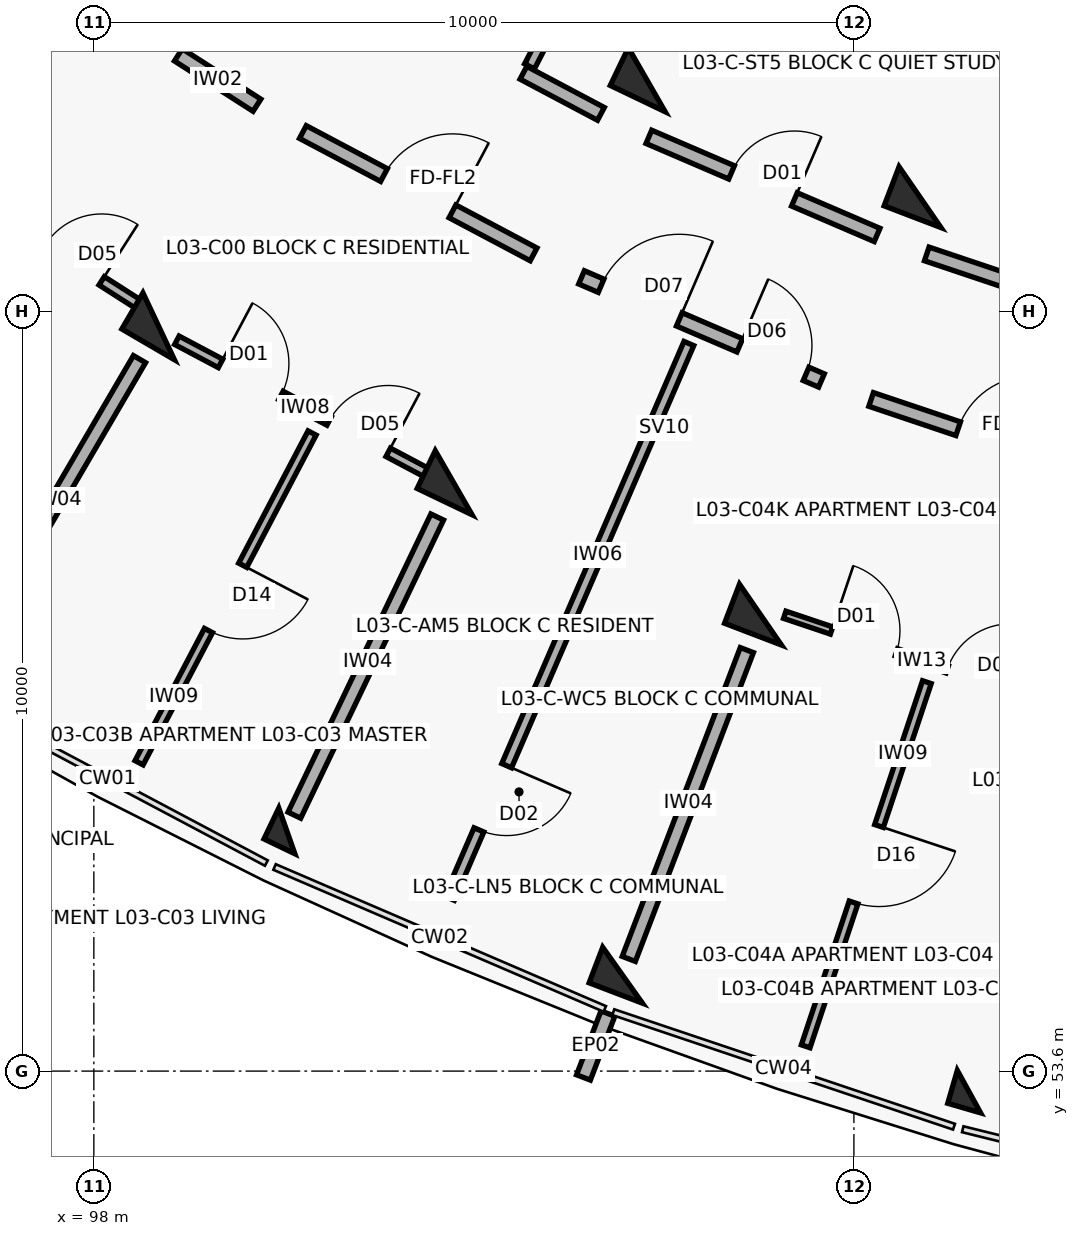
"""IFC4 building model, lengths in metres.
Left out: names, types, materials, properties, quantities, classifications, styles, units other than length and angle.
Written with IfcOpenShell. Run it as: python <this file> out.ifc"""

import sys

from ifc_helpers import new_model, si_unit, direction, frame, frame_2d, origin, origin_2d, place, context, subcontext, project, spatial, rectangle, extrude, element, fill, save


model = new_model("IFC4")
c1 = context("Model", 3, precision=1e-05, world=origin(), true_north=direction((0.0, 1.0)))
c2 = subcontext(c1, "Body", "Model", "MODEL_VIEW")
j1 = project(units=[si_unit("LENGTHUNIT", "METRE"), si_unit("PLANEANGLEUNIT", "RADIAN")], contexts=[c1])
p1 = place(None, origin())
s1 = spatial("IfcSite", under=j1, at=p1, CompositionType="ELEMENT")
p2 = place(p1, origin())
s2 = spatial("IfcBuilding", under=s1, at=p2, CompositionType="ELEMENT")
p3 = place(p2, frame((0.0, 0.0, 11.2)))
s3 = spatial("IfcBuildingStorey", under=s2, at=p3, CompositionType="ELEMENT", Elevation=11.2)
for number, where, z_axis, x_axis in (
    (1, (98.853, 63.4, 0.0), (0.0, 0.0, 1.0), (-0.504, -0.864, 0.0)),
    (2, (105.274, 66.644, 0.0), (0.0, 0.0, 1.0), (-0.432, -0.902, 0.0)),
    (3, (102.734, 61.341, 0.0), (0.0, 0.0, 1.0), (-0.432, -0.902, 0.0)),
):
    element("IfcColumn", number, at=place(p3, frame(where, z_axis=z_axis, x_axis=x_axis)), inside=s3, PredefinedType="COLUMN", context=c2, shape_type="SweptSolid", body=[
        extrude(rectangle(XDim=0.55, YDim=0.8, at=origin_2d()), origin(), (0.0, 0.0, 1.0), 3.1),
    ])
p4 = place(p3, frame((100.539, 56.76, 0.0), z_axis=(0.0, 0.0, 1.0), x_axis=(-0.432085748802, -0.901832526405, 0.0)))
e4 = element("IfcColumn", 4, at=p4, inside=s3, PredefinedType="COLUMN", context=c2, shape_type="SweptSolid", body=[
    extrude(rectangle(XDim=0.45, YDim=0.45, at=origin_2d()), origin(), (0.0, 0.0, 1.0), 3.1),
])
for number, where, z_axis, x_axis in (
    (5, (108.869, 65.099, 0.0), (0.0, 0.0, 1.0), (-0.357, -0.934, 0.0)),
    (6, (106.77, 59.606, 0.0), (0.0, 0.0, 1.0), (-0.357, -0.934, 0.0)),
):
    element("IfcColumn", number, at=place(p3, frame(where, z_axis=z_axis, x_axis=x_axis)), inside=s3, PredefinedType="COLUMN", context=c2, shape_type="SweptSolid", body=[
        extrude(rectangle(XDim=0.55, YDim=0.8, at=origin_2d()), origin(), (0.0, 0.0, 1.0), 3.1),
    ])
p5 = place(p3, frame((104.956, 54.861, 0.0), z_axis=(0.0, 0.0, 1.0), x_axis=(-0.357064076459, -0.934079892355, 0.0)))
e7 = element("IfcColumn", 7, at=p5, inside=s3, PredefinedType="COLUMN", context=c2, shape_type="SweptSolid", body=[
    extrude(rectangle(XDim=0.5, YDim=0.75, at=origin_2d()), origin(), (0.0, 0.0, 1.0), 3.1),
])
p6 = place(p3, frame((109.513, 53.329, 0.0), z_axis=(0.0, 0.0, 1.0), x_axis=(-0.27966144946, -0.96009867914, 0.0)))
e8 = element("IfcColumn", 8, at=p6, inside=s3, PredefinedType="COLUMN", context=c2, shape_type="SweptSolid", body=[
    extrude(rectangle(XDim=0.45, YDim=0.45, at=origin_2d()), origin(), (0.0, 0.0, 1.0), 3.1),
])
p7 = place(p3, frame((104.763, 54.357, 0.0), z_axis=(0.0, 0.0, 1.0), x_axis=(-0.357033038474, -0.934091756434, 0.0)))
e9 = element("IfcWall", 9, at=p7, inside=s3, PredefinedType="PARAPET", context=c2, shape_type="SweptSolid", body=[
    extrude(rectangle(XDim=0.9, YDim=0.195, at=frame_2d((0.45, 0.0))), origin(), (0.0, 0.0, 1.0), 2.25),
])
p8 = place(p3, frame((97.252, 68.161, 0.0), z_axis=(0.0, 0.0, 1.0), x_axis=(0.842289466461, -0.53902546757, 0.0)))
e10 = element("IfcWall", 10, at=p8, inside=s3, PredefinedType="SOLIDWALL", context=c2, shape_type="SweptSolid", body=[
    extrude(rectangle(XDim=3.436, YDim=0.19, at=frame_2d((1.718, 0.0))), origin(), (0.0, 0.0, 1.0), 2.08),
])
p9 = place(p8, frame((1.228, 0.0, 0.0)))
e11 = element("IfcOpeningElement", 11, at=p9, cuts=e10, PredefinedType="OPENING", context=c2, shape_type="SweptSolid", body=[
    extrude(rectangle(XDim=0.98, YDim=2.15, at=frame_2d((0.49, 1.075))), frame((0.0, 0.105, 0.0), z_axis=(0.0, -1.0, 0.0), x_axis=(1.0, 0.0, 0.0)), (0.0, 0.0, 1.0), 0.21),
])
p10 = place(p3, frame((95.462, 65.688, 0.0), z_axis=(0.0, 0.0, 1.0), x_axis=(0.842274914974, -0.539048205271, 0.0)))
e12 = element("IfcWall", 12, at=p10, inside=s3, PredefinedType="PARTITIONING", context=c2, shape_type="SweptSolid", body=[
    extrude(rectangle(XDim=3.785, YDim=0.13, at=frame_2d((1.893, 0.0))), origin(), (0.0, 0.0, 1.0), 2.08),
])
p11 = place(p10, frame((0.65, 0.0, 0.0)))
e13 = element("IfcOpeningElement", 13, at=p11, cuts=e12, PredefinedType="OPENING", context=c2, shape_type="SweptSolid", body=[
    extrude(rectangle(XDim=0.9, YDim=2.1, at=frame_2d((0.45, 1.05))), frame((0.0, 0.075, 0.0), z_axis=(0.0, -1.0, 0.0), x_axis=(1.0, 0.0, 0.0)), (0.0, 0.0, 1.0), 0.15),
])
p12 = place(p10, frame((2.255, 0.0, 0.0)))
e14 = element("IfcOpeningElement", 14, at=p12, cuts=e12, PredefinedType="OPENING", context=c2, shape_type="SweptSolid", body=[
    extrude(rectangle(XDim=0.88, YDim=2.1, at=frame_2d((0.44, 1.05))), frame((0.0, 0.075, 0.0), z_axis=(0.0, -1.0, 0.0), x_axis=(1.0, 0.0, 0.0)), (0.0, 0.0, 1.0), 0.15),
])
p13 = place(p3, frame((100.75, 65.956, 0.0), z_axis=(0.0, 0.0, 1.0), x_axis=(0.883440266101, -0.468543803963, 0.0)))
e15 = element("IfcWall", 15, at=p13, inside=s3, PredefinedType="SOLIDWALL", context=c2, shape_type="SweptSolid", body=[
    extrude(rectangle(XDim=3.436, YDim=0.19, at=frame_2d((1.718, 0.0))), origin(), (0.0, 0.0, 1.0), 2.08),
])
p14 = place(p13, frame((1.208, 0.0, 0.0)))
e16 = element("IfcOpeningElement", 16, at=p14, cuts=e15, PredefinedType="OPENING", context=c2, shape_type="SweptSolid", body=[
    extrude(rectangle(XDim=1.02, YDim=2.15, at=frame_2d((0.51, 1.075))), frame((0.0, 0.105, 0.0), z_axis=(0.0, -1.0, 0.0), x_axis=(1.0, 0.0, 0.0)), (0.0, 0.0, 1.0), 0.21),
])
p15 = place(p3, frame((101.784, 67.726, 0.0), z_axis=(0.0, 0.0, 1.0), x_axis=(0.883444301944, -0.468536194293, 0.0)))
e17 = element("IfcWall", 17, at=p15, inside=s3, PredefinedType="SOLIDWALL", context=c2, shape_type="SweptSolid", body=[
    extrude(rectangle(XDim=3.269, YDim=0.19, at=frame_2d((1.634, 0.0))), origin(), (0.0, 0.0, 1.0), 2.08),
])
p16 = place(p15, frame((1.154, 0.0, 0.0)))
e18 = element("IfcOpeningElement", 18, at=p16, cuts=e17, PredefinedType="OPENING", context=c2, shape_type="SweptSolid", body=[
    extrude(rectangle(XDim=0.96, YDim=2.1, at=frame_2d((0.48, 1.05))), frame((0.0, 0.105, 0.0), z_axis=(0.0, -1.0, 0.0), x_axis=(1.0, 0.0, 0.0)), (0.0, 0.0, 1.0), 0.21),
])
p17 = place(p3, frame((105.247, 69.752, 0.0), z_axis=(0.0, 0.0, 1.0), x_axis=(-0.459187433099, -0.888339406581, 0.0)))
e19 = element("IfcWall", 19, at=p17, inside=s3, PredefinedType="PARTITIONING", context=c2, shape_type="SweptSolid", body=[
    extrude(rectangle(XDim=3.3, YDim=0.145, at=frame_2d((1.65, 0.0))), origin(), (0.0, 0.0, 1.0), 2.08),
])
p18 = place(p17, frame((1.21, 0.0, 0.0)))
e20 = element("IfcOpeningElement", 20, at=p18, cuts=e19, PredefinedType="OPENING", context=c2, shape_type="SweptSolid", body=[
    extrude(rectangle(XDim=0.88, YDim=2.1, at=frame_2d((0.44, 1.05))), frame((0.0, 0.083, 0.0), z_axis=(0.0, -1.0, 0.0), x_axis=(1.0, 0.0, 0.0)), (0.0, 0.0, 1.0), 0.165),
])
p19 = place(p3, frame((99.093, 63.216, 0.0), z_axis=(0.0, 0.0, 1.0), x_axis=(0.883432667361, -0.468558131121, 0.0)))
e21 = element("IfcWall", 21, at=p19, inside=s3, PredefinedType="PARTITIONING", context=c2, shape_type="SweptSolid", body=[
    extrude(rectangle(XDim=3.797, YDim=0.125, at=frame_2d((1.899, 0.0))), origin(), (0.0, 0.0, 1.0), 2.08),
])
p20 = place(p19, frame((0.65, 0.0, 0.0)))
e22 = element("IfcOpeningElement", 22, at=p20, cuts=e21, PredefinedType="OPENING", context=c2, shape_type="SweptSolid", body=[
    extrude(rectangle(XDim=0.9, YDim=2.1, at=frame_2d((0.45, 1.05))), frame((0.0, 0.073, 0.0), z_axis=(0.0, -1.0, 0.0), x_axis=(1.0, 0.0, 0.0)), (0.0, 0.0, 1.0), 0.145),
])
p21 = place(p19, frame((2.267, 0.0, 0.0)))
e23 = element("IfcOpeningElement", 23, at=p21, cuts=e21, PredefinedType="OPENING", context=c2, shape_type="SweptSolid", body=[
    extrude(rectangle(XDim=0.88, YDim=2.1, at=frame_2d((0.44, 1.05))), frame((0.0, 0.073, 0.0), z_axis=(0.0, -1.0, 0.0), x_axis=(1.0, 0.0, 0.0)), (0.0, 0.0, 1.0), 0.145),
])
p22 = place(p3, frame((100.871, 61.996, 0.0), z_axis=(0.0, 0.0, 1.0), x_axis=(-0.464567298878, -0.885537816704, 0.0)))
e24 = element("IfcWall", 24, at=p22, inside=s3, PredefinedType="PARTITIONING", context=c2, shape_type="SweptSolid", body=[
    extrude(rectangle(XDim=4.9, YDim=0.12, at=frame_2d((2.45, 0.0))), origin(), (0.0, 0.0, 1.0), 2.08),
])
p23 = place(p22, frame((1.965, 0.0, 0.0)))
e25 = element("IfcOpeningElement", 25, at=p23, cuts=e24, PredefinedType="OPENING", context=c2, shape_type="SweptSolid", body=[
    extrude(rectangle(XDim=0.97, YDim=2.1, at=frame_2d((0.485, 1.05))), frame((0.0, 0.07, 0.0), z_axis=(0.0, -1.0, 0.0), x_axis=(1.0, 0.0, 0.0)), (0.0, 0.0, 1.0), 0.14),
])
p24 = place(p3, frame((98.601, 62.968, 0.0), z_axis=(0.0, 0.0, 1.0), x_axis=(-0.504216452091, -0.863577309475, 0.0)))
e26 = element("IfcWall", 26, at=p24, inside=s3, PredefinedType="SOLIDWALL", context=c2, shape_type="SweptSolid", body=[
    extrude(rectangle(XDim=4.35, YDim=0.185, at=frame_2d((2.175, 0.0))), origin(), (0.0, 0.0, 1.0), 2.08),
])
p25 = place(p3, frame((104.417, 64.044, 0.0), z_axis=(0.0, 0.0, 1.0), x_axis=(0.918718172399, -0.394913813008, 0.0)))
e27 = element("IfcWall", 27, at=p25, inside=s3, PredefinedType="SOLIDWALL", context=c2, shape_type="SweptSolid", body=[
    extrude(rectangle(XDim=3.436, YDim=0.19, at=frame_2d((1.718, 0.0))), origin(), (0.0, 0.0, 1.0), 2.08),
])
p26 = place(p25, frame((0.28, 0.0, 0.0)))
e28 = element("IfcOpeningElement", 28, at=p26, cuts=e27, PredefinedType="OPENING", context=c2, shape_type="SweptSolid", body=[
    extrude(rectangle(XDim=1.12, YDim=2.15, at=frame_2d((0.56, 1.075))), frame((0.0, 0.105, 0.0), z_axis=(0.0, -1.0, 0.0), x_axis=(1.0, 0.0, 0.0)), (0.0, 0.0, 1.0), 0.21),
])
p27 = place(p25, frame((2.266, 0.0, 0.0)))
e29 = element("IfcOpeningElement", 29, at=p27, cuts=e27, PredefinedType="OPENING", context=c2, shape_type="SweptSolid", body=[
    extrude(rectangle(XDim=0.95, YDim=2.1, at=frame_2d((0.475, 1.05))), frame((0.0, 0.105, 0.0), z_axis=(0.0, -1.0, 0.0), x_axis=(1.0, 0.0, 0.0)), (0.0, 0.0, 1.0), 0.21),
])
p28 = place(p3, frame((105.302, 65.893, 0.0), z_axis=(0.0, 0.0, 1.0), x_axis=(0.918723391052, -0.394901672235, 0.0)))
e30 = element("IfcWall", 30, at=p28, inside=s3, PredefinedType="SOLIDWALL", context=c2, shape_type="SweptSolid", body=[
    extrude(rectangle(XDim=3.269, YDim=0.19, at=frame_2d((1.634, 0.0))), origin(), (0.0, 0.0, 1.0), 2.08),
])
p29 = place(p28, frame((1.184, 0.0, 0.0)))
e31 = element("IfcOpeningElement", 31, at=p29, cuts=e30, PredefinedType="OPENING", context=c2, shape_type="SweptSolid", body=[
    extrude(rectangle(XDim=0.9, YDim=2.1, at=frame_2d((0.45, 1.05))), frame((0.0, 0.105, 0.0), z_axis=(0.0, -1.0, 0.0), x_axis=(1.0, 0.0, 0.0)), (0.0, 0.0, 1.0), 0.21),
])
p30 = place(p3, frame((105.829, 63.173, 0.0), z_axis=(0.0, 0.0, 1.0), x_axis=(-0.396278945437, -0.91813016365, 0.0)))
e32 = element("IfcWall", 32, at=p30, inside=s3, PredefinedType="PARTITIONING", context=c2, shape_type="SweptSolid", body=[
    extrude(rectangle(XDim=7.95, YDim=0.14, at=frame_2d((3.975, 0.0))), origin(), (0.0, 0.0, 1.0), 2.08),
])
p31 = place(p30, frame((6.05, 0.0, 0.0)))
e33 = element("IfcOpeningElement", 33, at=p31, cuts=e32, PredefinedType="OPENING", context=c2, shape_type="SweptSolid", body=[
    extrude(rectangle(XDim=0.92, YDim=2.1, at=frame_2d((0.46, 1.05))), frame((0.0, 0.08, 0.0), z_axis=(0.0, -1.0, 0.0), x_axis=(1.0, 0.0, 0.0)), (0.0, 0.0, 1.0), 0.16),
])
p32 = place(p3, frame((102.518, 60.89, 0.0), z_axis=(0.0, 0.0, 1.0), x_axis=(-0.432108769108, -0.901821496561, 0.0)))
e34 = element("IfcWall", 34, at=p32, inside=s3, PredefinedType="SOLIDWALL", context=c2, shape_type="SweptSolid", body=[
    extrude(rectangle(XDim=4.35, YDim=0.185, at=frame_2d((2.175, 0.0))), origin(), (0.0, 0.0, 1.0), 2.08),
])
p33 = place(p3, frame((108.227, 62.437, 0.0), z_axis=(0.0, 0.0, 1.0), x_axis=(0.947884468821, -0.318614239745, 0.0)))
e35 = element("IfcWall", 35, at=p33, inside=s3, PredefinedType="SOLIDWALL", context=c2, shape_type="SweptSolid", body=[
    extrude(rectangle(XDim=3.436, YDim=0.19, at=frame_2d((1.718, 0.0))), origin(), (0.0, 0.0, 1.0), 2.08),
])
p34 = place(p33, frame((1.208, 0.0, 0.0)))
e36 = element("IfcOpeningElement", 36, at=p34, cuts=e35, PredefinedType="OPENING", context=c2, shape_type="SweptSolid", body=[
    extrude(rectangle(XDim=1.02, YDim=2.15, at=frame_2d((0.51, 1.075))), frame((0.0, 0.105, 0.0), z_axis=(0.0, -1.0, 0.0), x_axis=(1.0, 0.0, 0.0)), (0.0, 0.0, 1.0), 0.21),
])
p35 = place(p3, frame((108.958, 64.352, 0.0), z_axis=(0.0, 0.0, 1.0), x_axis=(0.94787351033, -0.318646839643, 0.0)))
e37 = element("IfcWall", 37, at=p35, inside=s3, PredefinedType="SOLIDWALL", context=c2, shape_type="SweptSolid", body=[
    extrude(rectangle(XDim=3.269, YDim=0.19, at=frame_2d((1.634, 0.0))), origin(), (0.0, 0.0, 1.0), 2.08),
])
p36 = place(p35, frame((1.174, 0.0, 0.0)))
e38 = element("IfcOpeningElement", 38, at=p36, cuts=e37, PredefinedType="OPENING", context=c2, shape_type="SweptSolid", body=[
    extrude(rectangle(XDim=0.92, YDim=2.1, at=frame_2d((0.46, 1.05))), frame((0.0, 0.105, 0.0), z_axis=(0.0, -1.0, 0.0), x_axis=(1.0, 0.0, 0.0)), (0.0, 0.0, 1.0), 0.21),
])
p37 = place(p3, frame((107.09, 59.604, 0.0), z_axis=(0.0, 0.0, 1.0), x_axis=(0.947873924847, -0.318645606584, 0.0)))
e39 = element("IfcWall", 39, at=p37, inside=s3, PredefinedType="PARTITIONING", context=c2, shape_type="SweptSolid", body=[
    extrude(rectangle(XDim=3.785, YDim=0.1, at=frame_2d((1.893, 0.0))), origin(), (0.0, 0.0, 1.0), 2.08),
])
p38 = place(p37, frame((0.65, 0.0, 0.0)))
e40 = element("IfcOpeningElement", 40, at=p38, cuts=e39, PredefinedType="OPENING", context=c2, shape_type="SweptSolid", body=[
    extrude(rectangle(XDim=0.9, YDim=2.1, at=frame_2d((0.45, 1.05))), frame((0.0, 0.06, 0.0), z_axis=(0.0, -1.0, 0.0), x_axis=(1.0, 0.0, 0.0)), (0.0, 0.0, 1.0), 0.12),
])
p39 = place(p37, frame((2.255, 0.0, 0.0)))
e41 = element("IfcOpeningElement", 41, at=p39, cuts=e39, PredefinedType="OPENING", context=c2, shape_type="SweptSolid", body=[
    extrude(rectangle(XDim=0.88, YDim=2.1, at=frame_2d((0.44, 1.05))), frame((0.0, 0.06, 0.0), z_axis=(0.0, -1.0, 0.0), x_axis=(1.0, 0.0, 0.0)), (0.0, 0.0, 1.0), 0.12),
])
p40 = place(p3, frame((108.96, 58.718, 0.0), z_axis=(0.0, 0.0, 1.0), x_axis=(-0.315778138239, -0.948833055606, 0.0)))
e42 = element("IfcWall", 42, at=p40, inside=s3, PredefinedType="PARTITIONING", context=c2, shape_type="SweptSolid", body=[
    extrude(rectangle(XDim=5.05, YDim=0.12, at=frame_2d((2.525, 0.0))), origin(), (0.0, 0.0, 1.0), 2.08),
])
p41 = place(p40, frame((1.995, 0.0, 0.0)))
e43 = element("IfcOpeningElement", 43, at=p41, cuts=e42, PredefinedType="OPENING", context=c2, shape_type="SweptSolid", body=[
    extrude(rectangle(XDim=1.06, YDim=2.1, at=frame_2d((0.53, 1.05))), frame((0.0, 0.07, 0.0), z_axis=(0.0, -1.0, 0.0), x_axis=(1.0, 0.0, 0.0)), (0.0, 0.0, 1.0), 0.14),
])
p42 = place(p3, frame((106.591, 59.139, 0.0), z_axis=(0.0, 0.0, 1.0), x_axis=(-0.357064016205, -0.934079915388, 0.0)))
e44 = element("IfcWall", 44, at=p42, inside=s3, PredefinedType="SOLIDWALL", context=c2, shape_type="SweptSolid", body=[
    extrude(rectangle(XDim=4.35, YDim=0.185, at=frame_2d((2.175, 0.0))), origin(), (0.0, 0.0, 1.0), 2.08),
])
p43 = place(p9, origin())
e45 = element("IfcDoor", 45, at=p43, inside=s3, OperationType="SINGLE_SWING_LEFT", PredefinedType="DOOR", context=c2, shape_type="SweptSolid", body=[
    extrude(rectangle(XDim=0.98, YDim=2.15, at=frame_2d((0.49, 1.075))), frame((0.0, 0.025, 0.0), z_axis=(0.0, -1.0, 0.0), x_axis=(1.0, 0.0, 0.0)), (0.0, 0.0, 1.0), 0.05),
])
fill(e11, e45)
p44 = place(p12, origin())
e46 = element("IfcDoor", 46, at=p44, inside=s3, OperationType="SINGLE_SWING_RIGHT", PredefinedType="DOOR", context=c2, shape_type="SweptSolid", body=[
    extrude(rectangle(XDim=0.88, YDim=2.1, at=frame_2d((0.44, 1.05))), frame((0.0, 0.025, 0.0), z_axis=(0.0, -1.0, 0.0), x_axis=(1.0, 0.0, 0.0)), (0.0, 0.0, 1.0), 0.05),
])
fill(e14, e46)
p45 = place(p14, origin())
e47 = element("IfcDoor", 47, at=p45, inside=s3, OperationType="SINGLE_SWING_RIGHT", PredefinedType="DOOR", context=c2, shape_type="SweptSolid", body=[
    extrude(rectangle(XDim=1.02, YDim=2.15, at=frame_2d((0.51, 1.075))), frame((0.0, 0.025, 0.0), z_axis=(0.0, -1.0, 0.0), x_axis=(1.0, 0.0, 0.0)), (0.0, 0.0, 1.0), 0.05),
])
fill(e16, e47)
p46 = place(p16, origin())
e48 = element("IfcDoor", 48, at=p46, inside=s3, OperationType="SINGLE_SWING_LEFT", PredefinedType="DOOR", context=c2, shape_type="SweptSolid", body=[
    extrude(rectangle(XDim=0.96, YDim=2.1, at=frame_2d((0.48, 1.05))), frame((0.0, 0.025, 0.0), z_axis=(0.0, -1.0, 0.0), x_axis=(1.0, 0.0, 0.0)), (0.0, 0.0, 1.0), 0.05),
])
fill(e18, e48)
p47 = place(p20, origin())
e49 = element("IfcDoor", 49, at=p47, inside=s3, OperationType="SINGLE_SWING_LEFT", PredefinedType="DOOR", context=c2, shape_type="SweptSolid", body=[
    extrude(rectangle(XDim=0.9, YDim=2.1, at=frame_2d((0.45, 1.05))), frame((0.0, 0.025, 0.0), z_axis=(0.0, -1.0, 0.0), x_axis=(1.0, 0.0, 0.0)), (0.0, 0.0, 1.0), 0.05),
])
fill(e22, e49)
p48 = place(p21, origin())
e50 = element("IfcDoor", 50, at=p48, inside=s3, OperationType="SINGLE_SWING_RIGHT", PredefinedType="DOOR", context=c2, shape_type="SweptSolid", body=[
    extrude(rectangle(XDim=0.88, YDim=2.1, at=frame_2d((0.44, 1.05))), frame((0.0, 0.025, 0.0), z_axis=(0.0, -1.0, 0.0), x_axis=(1.0, 0.0, 0.0)), (0.0, 0.0, 1.0), 0.05),
])
fill(e23, e50)
p49 = place(p23, origin())
e51 = element("IfcDoor", 51, at=p49, inside=s3, OperationType="SINGLE_SWING_LEFT", PredefinedType="DOOR", context=c2, shape_type="SweptSolid", body=[
    extrude(rectangle(XDim=0.97, YDim=2.1, at=frame_2d((0.485, 1.05))), frame((0.0, 0.025, 0.0), z_axis=(0.0, -1.0, 0.0), x_axis=(1.0, 0.0, 0.0)), (0.0, 0.0, 1.0), 0.05),
])
fill(e25, e51)
p50 = place(p26, origin())
e52 = element("IfcDoor", 52, at=p50, inside=s3, OperationType="SINGLE_SWING_RIGHT", PredefinedType="DOOR", context=c2, shape_type="SweptSolid", body=[
    extrude(rectangle(XDim=1.12, YDim=2.15, at=frame_2d((0.56, 1.075))), frame((0.0, 0.025, 0.0), z_axis=(0.0, -1.0, 0.0), x_axis=(1.0, 0.0, 0.0)), (0.0, 0.0, 1.0), 0.05),
])
fill(e28, e52)
p51 = place(p27, origin())
e53 = element("IfcDoor", 53, at=p51, inside=s3, OperationType="SINGLE_SWING_LEFT", PredefinedType="DOOR", context=c2, shape_type="SweptSolid", body=[
    extrude(rectangle(XDim=0.95, YDim=2.1, at=frame_2d((0.475, 1.05))), frame((0.0, 0.025, 0.0), z_axis=(0.0, -1.0, 0.0), x_axis=(1.0, 0.0, 0.0)), (0.0, 0.0, 1.0), 0.05),
])
fill(e29, e53)
p52 = place(p29, origin())
e54 = element("IfcDoor", 54, at=p52, inside=s3, OperationType="SINGLE_SWING_RIGHT", PredefinedType="DOOR", context=c2, shape_type="SweptSolid", body=[
    extrude(rectangle(XDim=0.9, YDim=2.1, at=frame_2d((0.45, 1.05))), frame((0.0, 0.025, 0.0), z_axis=(0.0, -1.0, 0.0), x_axis=(1.0, 0.0, 0.0)), (0.0, 0.0, 1.0), 0.05),
])
fill(e31, e54)
p53 = place(p31, origin())
e55 = element("IfcDoor", 55, at=p53, inside=s3, OperationType="SINGLE_SWING_LEFT", PredefinedType="DOOR", context=c2, shape_type="SweptSolid", body=[
    extrude(rectangle(XDim=0.92, YDim=2.1, at=frame_2d((0.46, 1.05))), frame((0.0, 0.025, 0.0), z_axis=(0.0, -1.0, 0.0), x_axis=(1.0, 0.0, 0.0)), (0.0, 0.0, 1.0), 0.05),
])
fill(e33, e55)
p54 = place(p34, origin())
e56 = element("IfcDoor", 56, at=p54, inside=s3, OperationType="SINGLE_SWING_RIGHT", PredefinedType="DOOR", context=c2, shape_type="SweptSolid", body=[
    extrude(rectangle(XDim=1.02, YDim=2.15, at=frame_2d((0.51, 1.075))), frame((0.0, 0.025, 0.0), z_axis=(0.0, -1.0, 0.0), x_axis=(1.0, 0.0, 0.0)), (0.0, 0.0, 1.0), 0.05),
])
fill(e36, e56)
p55 = place(p38, origin())
e57 = element("IfcDoor", 57, at=p55, inside=s3, OperationType="SINGLE_SWING_LEFT", PredefinedType="DOOR", context=c2, shape_type="SweptSolid", body=[
    extrude(rectangle(XDim=0.9, YDim=2.1, at=frame_2d((0.45, 1.05))), frame((0.0, 0.025, 0.0), z_axis=(0.0, -1.0, 0.0), x_axis=(1.0, 0.0, 0.0)), (0.0, 0.0, 1.0), 0.05),
])
fill(e40, e57)
p56 = place(p39, origin())
e58 = element("IfcDoor", 58, at=p56, inside=s3, OperationType="SINGLE_SWING_RIGHT", PredefinedType="DOOR", context=c2, shape_type="SweptSolid", body=[
    extrude(rectangle(XDim=0.88, YDim=2.1, at=frame_2d((0.44, 1.05))), frame((0.0, 0.025, 0.0), z_axis=(0.0, -1.0, 0.0), x_axis=(1.0, 0.0, 0.0)), (0.0, 0.0, 1.0), 0.05),
])
fill(e41, e58)
p57 = place(p41, origin())
e59 = element("IfcDoor", 59, at=p57, inside=s3, OperationType="SINGLE_SWING_LEFT", PredefinedType="DOOR", context=c2, shape_type="SweptSolid", body=[
    extrude(rectangle(XDim=1.06, YDim=2.1, at=frame_2d((0.53, 1.05))), frame((0.0, 0.025, 0.0), z_axis=(0.0, -1.0, 0.0), x_axis=(1.0, 0.0, 0.0)), (0.0, 0.0, 1.0), 0.05),
])
fill(e43, e59)
save(model, sys.argv[1])
